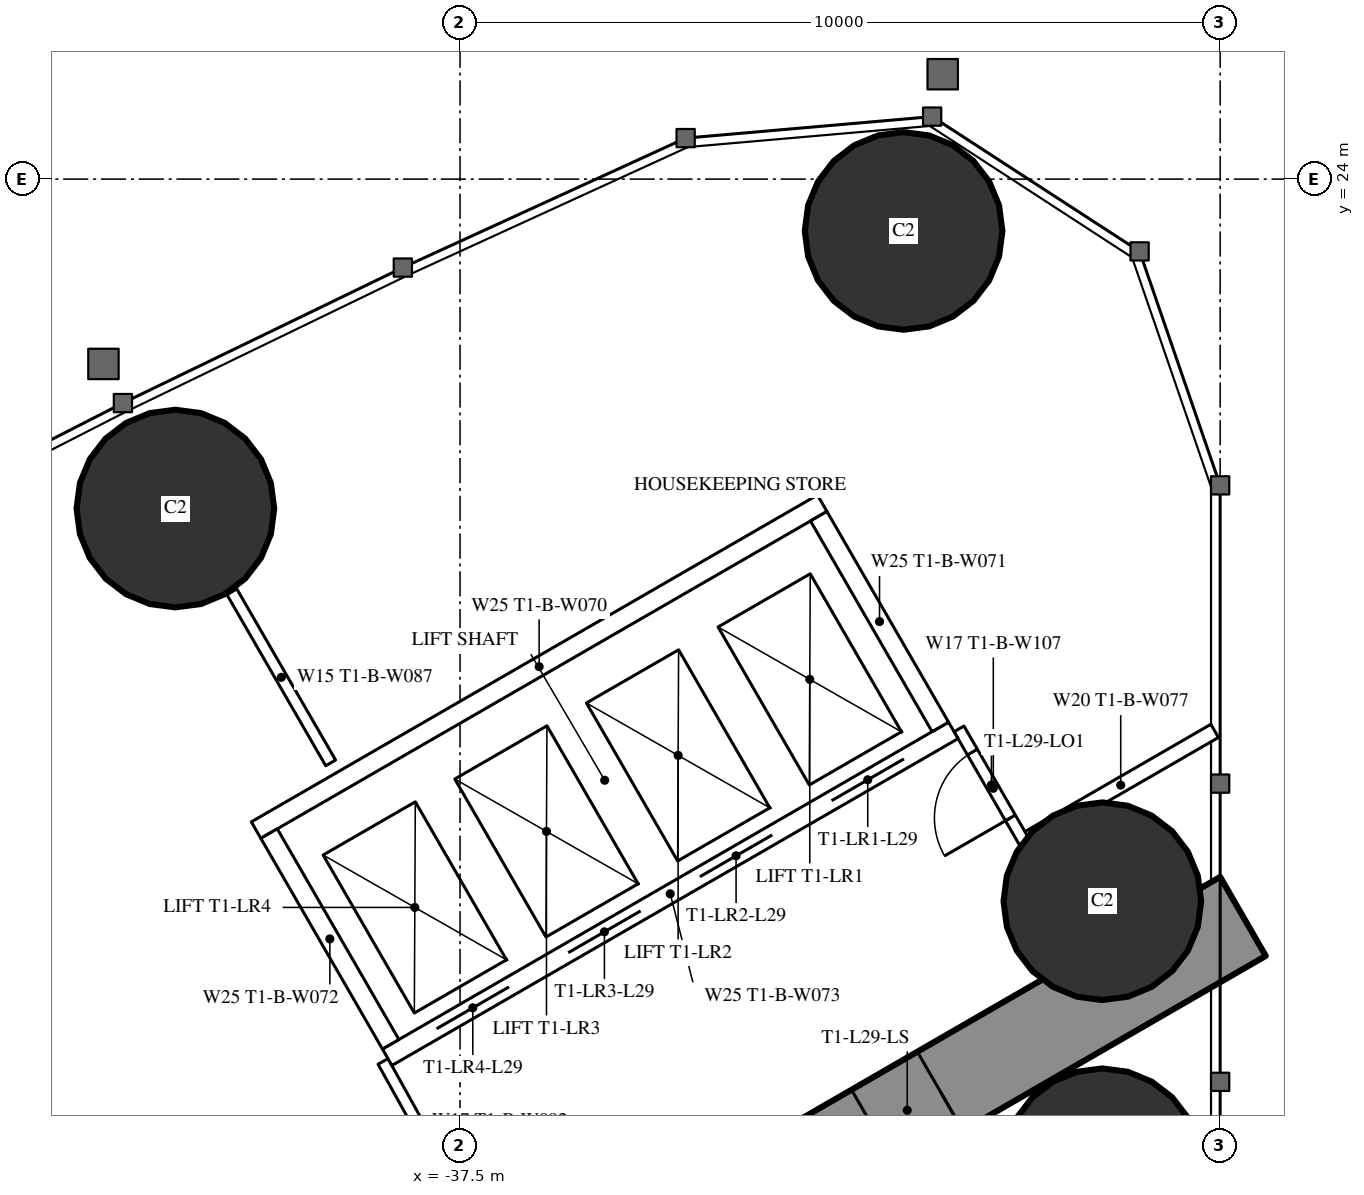
"""IFC4 building model, lengths in metres.
Left out: names, types, materials, properties, quantities, classifications, styles, units other than length and angle.
Written with IfcOpenShell. Run it as: python <this file> out.ifc"""

import sys

from ifc_helpers import new_model, si_unit, direction, frame, frame_2d, origin, origin_2d, place, context, subcontext, project, spatial, rectangle, hollow_circle, extrude, element, fill, save


model = new_model("IFC4")
c1 = context("Model", 3, precision=1e-05, world=origin(), true_north=direction((0.0, 1.0)))
c2 = subcontext(c1, "Body", "Model", "MODEL_VIEW")
j1 = project(units=[si_unit("LENGTHUNIT", "METRE"), si_unit("PLANEANGLEUNIT", "RADIAN")], contexts=[c1])
p1 = place(None, origin())
s1 = spatial("IfcSite", under=j1, at=p1, CompositionType="ELEMENT")
p2 = place(p1, origin())
s2 = spatial("IfcBuilding", under=s1, at=p2, CompositionType="ELEMENT")
p3 = place(p2, frame((0.0, 0.0, 111.6)))
s3 = spatial("IfcBuildingStorey", under=s2, at=p3, CompositionType="ELEMENT", Elevation=111.6)
for number, where, z_axis, x_axis in (
    (1, (-31.665, 23.318, 0.0), (0.0, 0.0, 1.0), (1.0, 0.0, 0.0)),
    (2, (-29.05, 11.0, 0.0), (0.0, 0.0, 1.0), (1.0, 0.0, 0.0)),
    (3, (-29.05, 14.5, 0.0), (0.0, 0.0, 1.0), (1.0, 0.0, 0.0)),
    (4, (-41.245, 19.666, 0.0), (0.0, 0.0, 1.0), (1.0, 0.0, 0.0)),
):
    element("IfcColumn", number, at=place(p3, frame(where, z_axis=z_axis, x_axis=x_axis)), inside=s3, PredefinedType="COLUMN", context=c2, shape_type="SweptSolid", body=[
        extrude(hollow_circle(Radius=1.3, WallThickness=0.1, at=origin_2d()), origin(), (0.0, 0.0, 1.0), 3.5),
    ])
p4 = place(p3, frame((-27.2, 14.3, 0.0), z_axis=(0.0, 0.0, 1.0), x_axis=(-0.866026593062, -0.499997940104, 0.0)))
e5 = element("IfcWall", 5, at=p4, inside=s3, PredefinedType="SHEAR", context=c2, shape_type="SweptSolid", body=[
    extrude(rectangle(XDim=28.946, YDim=1.2, at=frame_2d((14.473, 0.0))), origin(), (0.0, 0.0, 1.0), 3.5),
])
p5 = place(p4, frame((4.6, 0.0, 0.0)))
e6 = element("IfcOpeningElement", 6, at=p5, cuts=e5, PredefinedType="OPENING", context=c2, shape_type="SweptSolid", body=[
    extrude(rectangle(XDim=1.0, YDim=2.2, at=frame_2d((0.5, 1.1))), frame((0.0, 0.61, 0.0), z_axis=(0.0, -1.0, 0.0), x_axis=(1.0, 0.0, 0.0)), (0.0, 0.0, 1.0), 1.22),
])
p6 = place(p4, frame((13.395, 0.0, 0.0)))
e7 = element("IfcOpeningElement", 7, at=p6, cuts=e5, PredefinedType="OPENING", context=c2, shape_type="SweptSolid", body=[
    extrude(rectangle(XDim=1.8, YDim=2.2, at=frame_2d((0.9, 1.1))), frame((0.0, 0.61, 0.0), z_axis=(0.0, -1.0, 0.0), x_axis=(1.0, 0.0, 0.0)), (0.0, 0.0, 1.0), 1.22),
])
p7 = place(p3, frame((-39.202, 16.32, 0.0), z_axis=(0.0, 0.0, 1.0), x_axis=(-0.499947391036, 0.866055775454, 0.0)))
e8 = element("IfcWall", 8, at=p7, inside=s3, PredefinedType="PARTITIONING", context=c2, shape_type="SweptSolid", body=[
    extrude(rectangle(XDim=2.599, YDim=0.15, at=frame_2d((1.3, 0.0))), origin(), (0.0, 0.0, 1.0), 3.25),
])
p8 = place(p3, frame((-27.572, 16.741, 0.0), z_axis=(0.0, 0.0, 1.0), x_axis=(-0.866034618596, -0.499984039138, 0.0)))
e9 = element("IfcWall", 9, at=p8, inside=s3, PredefinedType="PARTITIONING", context=c2, shape_type="SweptSolid", body=[
    extrude(rectangle(XDim=2.854, YDim=0.2, at=frame_2d((1.427, 0.0))), origin(), (0.0, 0.0, 1.0), 3.25),
])
p9 = place(p3, frame((-38.513, 12.392, 0.0), z_axis=(0.0, 0.0, 1.0), x_axis=(0.485585508183, -0.874189175317, 0.0)))
e10 = element("IfcWall", 10, at=p9, inside=s3, PredefinedType="PARTITIONING", context=c2, shape_type="SweptSolid", body=[
    extrude(rectangle(XDim=1.805, YDim=0.15, at=frame_2d((0.902, 0.0))), origin(), (0.0, 0.0, 1.0), 3.25),
])
p10 = place(p3, frame((-30.033, 15.205, 0.0), z_axis=(0.0, 0.0, 1.0), x_axis=(-0.499980071345, 0.866036909293, 0.0)))
e11 = element("IfcWall", 11, at=p10, inside=s3, PredefinedType="PARTITIONING", context=c2, shape_type="SweptSolid", body=[
    extrude(rectangle(XDim=1.805, YDim=0.15, at=frame_2d((0.902, 0.0))), origin(), (0.0, 0.0, 1.0), 2.2),
])
p11 = place(p10, frame((0.452, 0.0, 0.0)))
e12 = element("IfcOpeningElement", 12, at=p11, cuts=e11, PredefinedType="OPENING", context=c2, shape_type="SweptSolid", body=[
    extrude(rectangle(XDim=1.0, YDim=2.2, at=frame_2d((0.5, 1.1))), frame((0.0, 0.085, 0.0), z_axis=(0.0, -1.0, 0.0), x_axis=(1.0, 0.0, 0.0)), (0.0, 0.0, 1.0), 0.17),
])
p12 = place(p3, frame((-31.01, 16.747, 0.0), z_axis=(0.0, 0.0, 1.0), x_axis=(-0.866028165386, -0.499995216735, 0.0)))
e13 = element("IfcWall", 13, at=p12, inside=s3, PredefinedType="PARTITIONING", context=c2, shape_type="SweptSolid", body=[
    extrude(rectangle(XDim=8.6, YDim=0.25, at=frame_2d((4.3, 0.0))), origin(), (0.0, 0.0, 1.0), 3.25),
])
p13 = place(p12, frame((0.75, 0.0, 0.0)))
e14 = element("IfcOpeningElement", 14, at=p13, cuts=e13, PredefinedType="OPENING", context=c2, shape_type="SweptSolid", body=[
    extrude(rectangle(XDim=1.1, YDim=2.2, at=frame_2d((0.55, 1.1))), frame((0.0, 0.135, 0.0), z_axis=(0.0, -1.0, 0.0), x_axis=(1.0, 0.0, 0.0)), (0.0, 0.0, 1.0), 0.27),
])
p14 = place(p12, frame((2.75, 0.0, 0.0)))
e15 = element("IfcOpeningElement", 15, at=p14, cuts=e13, PredefinedType="OPENING", context=c2, shape_type="SweptSolid", body=[
    extrude(rectangle(XDim=1.1, YDim=2.2, at=frame_2d((0.55, 1.1))), frame((0.0, 0.135, 0.0), z_axis=(0.0, -1.0, 0.0), x_axis=(1.0, 0.0, 0.0)), (0.0, 0.0, 1.0), 0.27),
])
p15 = place(p12, frame((4.75, 0.0, 0.0)))
e16 = element("IfcOpeningElement", 16, at=p15, cuts=e13, PredefinedType="OPENING", context=c2, shape_type="SweptSolid", body=[
    extrude(rectangle(XDim=1.1, YDim=2.2, at=frame_2d((0.55, 1.1))), frame((0.0, 0.135, 0.0), z_axis=(0.0, -1.0, 0.0), x_axis=(1.0, 0.0, 0.0)), (0.0, 0.0, 1.0), 0.27),
])
p16 = place(p12, frame((6.75, 0.0, 0.0)))
e17 = element("IfcOpeningElement", 17, at=p16, cuts=e13, PredefinedType="OPENING", context=c2, shape_type="SweptSolid", body=[
    extrude(rectangle(XDim=1.1, YDim=2.2, at=frame_2d((0.55, 1.1))), frame((0.0, 0.135, 0.0), z_axis=(0.0, -1.0, 0.0), x_axis=(1.0, 0.0, 0.0)), (0.0, 0.0, 1.0), 0.27),
])
p17 = place(p3, frame((-32.736, 19.736, 0.0), z_axis=(0.0, 0.0, 1.0), x_axis=(-0.866028165386, -0.499995216735, 0.0)))
e18 = element("IfcWall", 18, at=p17, inside=s3, PredefinedType="PARTITIONING", context=c2, shape_type="SweptSolid", body=[
    extrude(rectangle(XDim=8.6, YDim=0.25, at=frame_2d((4.3, 0.0))), origin(), (0.0, 0.0, 1.0), 3.25),
])
p18 = place(p3, frame((-31.181, 16.793, 0.0), z_axis=(0.0, 0.0, 1.0), x_axis=(-0.499929347863, 0.866066190972, 0.0)))
e19 = element("IfcWall", 19, at=p18, inside=s3, PredefinedType="PARTITIONING", context=c2, shape_type="SweptSolid", body=[
    extrude(rectangle(XDim=3.201, YDim=0.25, at=frame_2d((1.6, 0.0))), origin(), (0.0, 0.0, 1.0), 3.25),
])
p19 = place(p3, frame((-38.413, 12.618, 0.0), z_axis=(0.0, 0.0, 1.0), x_axis=(-0.499872130319, 0.866099216793, 0.0)))
e20 = element("IfcWall", 20, at=p19, inside=s3, PredefinedType="PARTITIONING", context=c2, shape_type="SweptSolid", body=[
    extrude(rectangle(XDim=3.2, YDim=0.25, at=frame_2d((1.6, 0.0))), origin(), (0.0, 0.0, 1.0), 3.25),
])
p20 = place(p11, origin())
e21 = element("IfcDoor", 21, at=p20, inside=s3, OperationType="SINGLE_SWING_LEFT", PredefinedType="DOOR", context=c2, shape_type="SweptSolid", body=[
    extrude(rectangle(XDim=1.0, YDim=2.2, at=frame_2d((0.5, 1.1))), frame((0.0, 0.025, 0.0), z_axis=(0.0, -1.0, 0.0), x_axis=(1.0, 0.0, 0.0)), (0.0, 0.0, 1.0), 0.05),
])
fill(e12, e21)
p21 = place(p5, origin())
e22 = element("IfcDoor", 22, at=p21, inside=s3, OperationType="SINGLE_SWING_LEFT", PredefinedType="DOOR", context=c2, shape_type="SweptSolid", body=[
    extrude(rectangle(XDim=1.0, YDim=2.2, at=frame_2d((0.5, 1.1))), frame((0.0, 0.025, 0.0), z_axis=(0.0, -1.0, 0.0), x_axis=(1.0, 0.0, 0.0)), (0.0, 0.0, 1.0), 0.05),
])
fill(e6, e22)
p22 = place(p13, origin())
e23 = element("IfcDoor", 23, at=p22, inside=s3, OperationType="DOUBLE_DOOR_SLIDING", PredefinedType="USERDEFINED", context=c2, shape_type="SweptSolid", body=[
    extrude(rectangle(XDim=1.1, YDim=2.2, at=frame_2d((0.55, 1.1))), frame((0.0, 0.025, 0.0), z_axis=(0.0, -1.0, 0.0), x_axis=(1.0, 0.0, 0.0)), (0.0, 0.0, 1.0), 0.05),
])
fill(e14, e23)
p23 = place(p14, origin())
e24 = element("IfcDoor", 24, at=p23, inside=s3, OperationType="DOUBLE_DOOR_SLIDING", PredefinedType="USERDEFINED", context=c2, shape_type="SweptSolid", body=[
    extrude(rectangle(XDim=1.1, YDim=2.2, at=frame_2d((0.55, 1.1))), frame((0.0, 0.025, 0.0), z_axis=(0.0, -1.0, 0.0), x_axis=(1.0, 0.0, 0.0)), (0.0, 0.0, 1.0), 0.05),
])
fill(e15, e24)
p24 = place(p15, origin())
e25 = element("IfcDoor", 25, at=p24, inside=s3, OperationType="DOUBLE_DOOR_SLIDING", PredefinedType="USERDEFINED", context=c2, shape_type="SweptSolid", body=[
    extrude(rectangle(XDim=1.1, YDim=2.2, at=frame_2d((0.55, 1.1))), frame((0.0, 0.025, 0.0), z_axis=(0.0, -1.0, 0.0), x_axis=(1.0, 0.0, 0.0)), (0.0, 0.0, 1.0), 0.05),
])
fill(e16, e25)
p25 = place(p16, origin())
e26 = element("IfcDoor", 26, at=p25, inside=s3, OperationType="DOUBLE_DOOR_SLIDING", PredefinedType="USERDEFINED", context=c2, shape_type="SweptSolid", body=[
    extrude(rectangle(XDim=1.1, YDim=2.2, at=frame_2d((0.55, 1.1))), frame((0.0, 0.025, 0.0), z_axis=(0.0, -1.0, 0.0), x_axis=(1.0, 0.0, 0.0)), (0.0, 0.0, 1.0), 0.05),
])
fill(e17, e26)
save(model, sys.argv[1])
